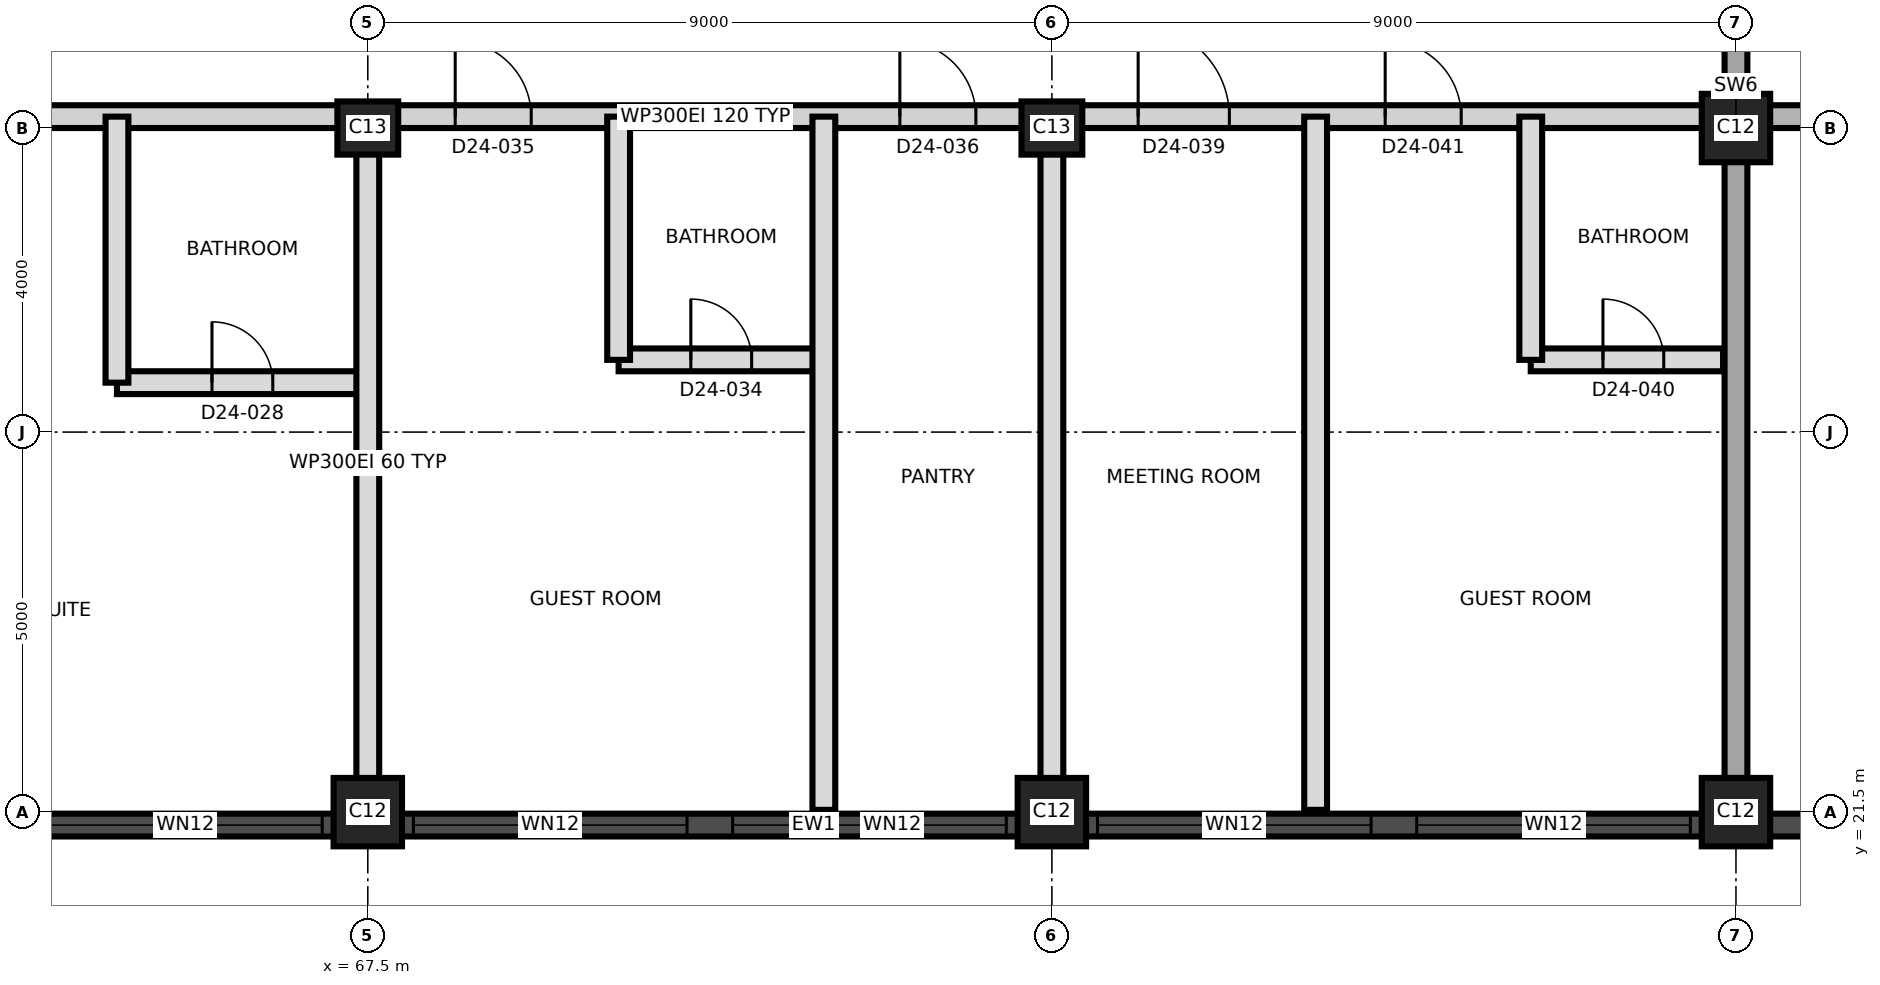
"""IFC4 building model, lengths in metres.
Left out: names, types, materials, properties, quantities, classifications, styles, units other than length and angle.
Written with IfcOpenShell. Run it as: python <this file> out.ifc"""

import sys

from ifc_helpers import new_model, si_unit, direction, frame, frame_2d, origin, origin_2d, place, context, subcontext, project, spatial, rectangle, extrude, element, fill, save


model = new_model("IFC4")
c1 = context("Model", 3, precision=1e-05, world=origin(), true_north=direction((0.0, 1.0)))
c2 = subcontext(c1, "Body", "Model", "MODEL_VIEW")
j1 = project(units=[si_unit("LENGTHUNIT", "METRE"), si_unit("PLANEANGLEUNIT", "RADIAN")], contexts=[c1])
p1 = place(None, origin())
s1 = spatial("IfcSite", under=j1, at=p1, CompositionType="ELEMENT")
p2 = place(p1, origin())
s2 = spatial("IfcBuilding", under=s1, at=p2, CompositionType="ELEMENT")
p3 = place(p2, frame((0.0, 0.0, 218.0)))
s3 = spatial("IfcBuildingStorey", under=s2, at=p3, CompositionType="ELEMENT", Elevation=218.0)
for number, where, z_axis, x_axis in (
    (1, (67.5, 21.5, 0.0), (0.0, 0.0, 1.0), (1.0, 0.0, 0.0)),
    (2, (76.5, 21.5, 0.0), (0.0, 0.0, 1.0), (1.0, 0.0, 0.0)),
    (3, (85.5, 21.5, 0.0), (0.0, 0.0, 1.0), (1.0, 0.0, 0.0)),
):
    element("IfcColumn", number, at=place(p3, frame(where, z_axis=z_axis, x_axis=x_axis)), inside=s3, PredefinedType="COLUMN", context=c2, shape_type="SweptSolid", body=[
        extrude(rectangle(XDim=0.9, YDim=0.9, at=origin_2d()), origin(), (0.0, 0.0, 1.0), 3.7),
    ])
for number, where, z_axis, x_axis in (
    (4, (67.5, 30.5, 0.0), (0.0, 0.0, 1.0), (1.0, 0.0, 0.0)),
    (5, (76.5, 30.5, 0.0), (0.0, 0.0, 1.0), (1.0, 0.0, 0.0)),
):
    element("IfcColumn", number, at=place(p3, frame(where, z_axis=z_axis, x_axis=x_axis)), inside=s3, PredefinedType="COLUMN", context=c2, shape_type="SweptSolid", body=[
        extrude(rectangle(XDim=0.8, YDim=0.7, at=origin_2d()), origin(), (0.0, 0.0, 1.0), 3.7),
    ])
p4 = place(p3, frame((85.5, 30.5, 0.0), z_axis=(0.0, 0.0, 1.0), x_axis=(1.0, 0.0, 0.0)))
e6 = element("IfcColumn", 6, at=p4, inside=s3, PredefinedType="COLUMN", context=c2, shape_type="SweptSolid", body=[
    extrude(rectangle(XDim=0.9, YDim=0.9, at=origin_2d()), origin(), (0.0, 0.0, 1.0), 3.7),
])
p5 = place(p3, frame((85.5, 21.53, 0.0), z_axis=(0.0, 0.0, 1.0), x_axis=(0.0, 1.0, 0.0)))
e7 = element("IfcWall", 7, at=p5, inside=s3, PredefinedType="SHEAR", context=c2, shape_type="SweptSolid", body=[
    extrude(rectangle(XDim=17.94, YDim=0.3, at=frame_2d((8.97, 0.0))), origin(), (0.0, 0.0, 1.0), 3.7),
])
p6 = place(p5, frame((10.17, 0.0, 0.0)))
e8 = element("IfcOpeningElement", 8, at=p6, cuts=e7, PredefinedType="OPENING", context=c2, shape_type="SweptSolid", body=[
    extrude(rectangle(XDim=1.4, YDim=2.1, at=frame_2d((0.7, 1.05))), frame((0.0, 0.16, 0.0), z_axis=(0.0, -1.0, 0.0), x_axis=(1.0, 0.0, 0.0)), (0.0, 0.0, 1.0), 0.32),
])
p7 = place(p3, frame((59.25, 21.33, 0.0), z_axis=(0.0, 0.0, 1.0), x_axis=(1.0, 0.0, 0.0)))
e9 = element("IfcWall", 9, at=p7, inside=s3, PredefinedType="SOLIDWALL", context=c2, shape_type="SweptSolid", body=[
    extrude(rectangle(XDim=28.234, YDim=0.3, at=frame_2d((14.117, 0.0))), origin(), (0.0, 0.0, 1.0), 3.4),
])
p8 = place(p7, frame((0.975, 0.0, 0.3)))
e10 = element("IfcOpeningElement", 10, at=p8, cuts=e9, PredefinedType="OPENING", context=c2, shape_type="SweptSolid", body=[
    extrude(rectangle(XDim=1.8, YDim=2.4, at=frame_2d((0.9, 1.2))), frame((0.0, 0.16, 0.0), z_axis=(0.0, -1.0, 0.0), x_axis=(1.0, 0.0, 0.0)), (0.0, 0.0, 1.0), 0.32),
])
p9 = place(p7, frame((4.05, 0.0, 0.9)))
e11 = element("IfcOpeningElement", 11, at=p9, cuts=e9, PredefinedType="OPENING", context=c2, shape_type="SweptSolid", body=[
    extrude(rectangle(XDim=3.6, YDim=1.5, at=frame_2d((1.8, 0.75))), frame((0.0, 0.16, 0.0), z_axis=(0.0, -1.0, 0.0), x_axis=(1.0, 0.0, 0.0)), (0.0, 0.0, 1.0), 0.32),
])
p10 = place(p7, frame((8.85, 0.0, 0.9)))
e12 = element("IfcOpeningElement", 12, at=p10, cuts=e9, PredefinedType="OPENING", context=c2, shape_type="SweptSolid", body=[
    extrude(rectangle(XDim=3.6, YDim=1.5, at=frame_2d((1.8, 0.75))), frame((0.0, 0.16, 0.0), z_axis=(0.0, -1.0, 0.0), x_axis=(1.0, 0.0, 0.0)), (0.0, 0.0, 1.0), 0.32),
])
p11 = place(p7, frame((13.05, 0.0, 0.9)))
e13 = element("IfcOpeningElement", 13, at=p11, cuts=e9, PredefinedType="OPENING", context=c2, shape_type="SweptSolid", body=[
    extrude(rectangle(XDim=3.6, YDim=1.5, at=frame_2d((1.8, 0.75))), frame((0.0, 0.16, 0.0), z_axis=(0.0, -1.0, 0.0), x_axis=(1.0, 0.0, 0.0)), (0.0, 0.0, 1.0), 0.32),
])
p12 = place(p7, frame((17.85, 0.0, 0.9)))
e14 = element("IfcOpeningElement", 14, at=p12, cuts=e9, PredefinedType="OPENING", context=c2, shape_type="SweptSolid", body=[
    extrude(rectangle(XDim=3.6, YDim=1.5, at=frame_2d((1.8, 0.75))), frame((0.0, 0.16, 0.0), z_axis=(0.0, -1.0, 0.0), x_axis=(1.0, 0.0, 0.0)), (0.0, 0.0, 1.0), 0.32),
])
p13 = place(p7, frame((22.05, 0.0, 0.9)))
e15 = element("IfcOpeningElement", 15, at=p13, cuts=e9, PredefinedType="OPENING", context=c2, shape_type="SweptSolid", body=[
    extrude(rectangle(XDim=3.6, YDim=1.5, at=frame_2d((1.8, 0.75))), frame((0.0, 0.16, 0.0), z_axis=(0.0, -1.0, 0.0), x_axis=(1.0, 0.0, 0.0)), (0.0, 0.0, 1.0), 0.32),
])
p14 = place(p3, frame((64.2, 27.15, 0.0), z_axis=(0.0, 0.0, 1.0), x_axis=(1.0, 0.0, 0.0)))
e16 = element("IfcWall", 16, at=p14, inside=s3, PredefinedType="PARTITIONING", context=c2, shape_type="SweptSolid", body=[
    extrude(rectangle(XDim=3.3, YDim=0.3, at=frame_2d((1.65, 0.0))), origin(), (0.0, 0.0, 1.0), 3.4),
])
p15 = place(p14, frame((1.25, 0.0, 0.0)))
e17 = element("IfcOpeningElement", 17, at=p15, cuts=e16, PredefinedType="OPENING", context=c2, shape_type="SweptSolid", body=[
    extrude(rectangle(XDim=0.8, YDim=2.1, at=frame_2d((0.4, 1.05))), frame((0.0, 0.16, 0.0), z_axis=(0.0, -1.0, 0.0), x_axis=(1.0, 0.0, 0.0)), (0.0, 0.0, 1.0), 0.32),
])
p16 = place(p3, frame((70.8, 27.45, 0.0), z_axis=(0.0, 0.0, 1.0), x_axis=(1.0, 0.0, 0.0)))
e18 = element("IfcWall", 18, at=p16, inside=s3, PredefinedType="PARTITIONING", context=c2, shape_type="SweptSolid", body=[
    extrude(rectangle(XDim=2.7, YDim=0.3, at=frame_2d((1.35, 0.0))), origin(), (0.0, 0.0, 1.0), 3.4),
])
p17 = place(p16, frame((0.95, 0.0, 0.0)))
e19 = element("IfcOpeningElement", 19, at=p17, cuts=e18, PredefinedType="OPENING", context=c2, shape_type="SweptSolid", body=[
    extrude(rectangle(XDim=0.8, YDim=2.1, at=frame_2d((0.4, 1.05))), frame((0.0, 0.16, 0.0), z_axis=(0.0, -1.0, 0.0), x_axis=(1.0, 0.0, 0.0)), (0.0, 0.0, 1.0), 0.32),
])
p18 = place(p3, frame((82.8, 27.45, 0.0), z_axis=(0.0, 0.0, 1.0), x_axis=(1.0, 0.0, 0.0)))
e20 = element("IfcWall", 20, at=p18, inside=s3, PredefinedType="PARTITIONING", context=c2, shape_type="SweptSolid", body=[
    extrude(rectangle(XDim=2.53, YDim=0.3, at=frame_2d((1.265, 0.0))), origin(), (0.0, 0.0, 1.0), 3.4),
])
p19 = place(p18, frame((0.95, 0.0, 0.0)))
e21 = element("IfcOpeningElement", 21, at=p19, cuts=e20, PredefinedType="OPENING", context=c2, shape_type="SweptSolid", body=[
    extrude(rectangle(XDim=0.8, YDim=2.1, at=frame_2d((0.4, 1.05))), frame((0.0, 0.16, 0.0), z_axis=(0.0, -1.0, 0.0), x_axis=(1.0, 0.0, 0.0)), (0.0, 0.0, 1.0), 0.32),
])
p20 = place(p3, frame((58.55, 30.65, 0.0), z_axis=(0.0, 0.0, 1.0), x_axis=(1.0, 0.0, 0.0)))
e22 = element("IfcWall", 22, at=p20, inside=s3, PredefinedType="PARTITIONING", context=c2, shape_type="SweptSolid", body=[
    extrude(rectangle(XDim=26.78, YDim=0.3, at=frame_2d((13.39, 0.0))), origin(), (0.0, 0.0, 1.0), 3.4),
])
p21 = place(p20, frame((2.3, 0.0, 0.0)))
e23 = element("IfcOpeningElement", 23, at=p21, cuts=e22, PredefinedType="OPENING", context=c2, shape_type="SweptSolid", body=[
    extrude(rectangle(XDim=1.0, YDim=2.4, at=frame_2d((0.5, 1.2))), frame((0.0, 0.16, 0.0), z_axis=(0.0, -1.0, 0.0), x_axis=(1.0, 0.0, 0.0)), (0.0, 0.0, 1.0), 0.32),
])
p22 = place(p20, frame((10.1, 0.0, 0.0)))
e24 = element("IfcOpeningElement", 24, at=p22, cuts=e22, PredefinedType="OPENING", context=c2, shape_type="SweptSolid", body=[
    extrude(rectangle(XDim=1.0, YDim=2.1, at=frame_2d((0.5, 1.05))), frame((0.0, 0.16, 0.0), z_axis=(0.0, -1.0, 0.0), x_axis=(1.0, 0.0, 0.0)), (0.0, 0.0, 1.0), 0.32),
])
p23 = place(p20, frame((15.95, 0.0, 0.0)))
e25 = element("IfcOpeningElement", 25, at=p23, cuts=e22, PredefinedType="OPENING", context=c2, shape_type="SweptSolid", body=[
    extrude(rectangle(XDim=1.0, YDim=2.1, at=frame_2d((0.5, 1.05))), frame((0.0, 0.16, 0.0), z_axis=(0.0, -1.0, 0.0), x_axis=(1.0, 0.0, 0.0)), (0.0, 0.0, 1.0), 0.32),
])
p24 = place(p20, frame((19.085, 0.0, 0.0)))
e26 = element("IfcOpeningElement", 26, at=p24, cuts=e22, PredefinedType="OPENING", context=c2, shape_type="SweptSolid", body=[
    extrude(rectangle(XDim=1.2, YDim=2.1, at=frame_2d((0.6, 1.05))), frame((0.0, 0.16, 0.0), z_axis=(0.0, -1.0, 0.0), x_axis=(1.0, 0.0, 0.0)), (0.0, 0.0, 1.0), 0.32),
])
p25 = place(p20, frame((22.335, 0.0, 0.0)))
e27 = element("IfcOpeningElement", 27, at=p25, cuts=e22, PredefinedType="OPENING", context=c2, shape_type="SweptSolid", body=[
    extrude(rectangle(XDim=1.0, YDim=2.1, at=frame_2d((0.5, 1.05))), frame((0.0, 0.16, 0.0), z_axis=(0.0, -1.0, 0.0), x_axis=(1.0, 0.0, 0.0)), (0.0, 0.0, 1.0), 0.32),
])
p26 = place(p3, frame((85.67, 30.65, 0.0), z_axis=(0.0, 0.0, 1.0), x_axis=(1.0, 0.0, 0.0)))
e28 = element("IfcWall", 28, at=p26, inside=s3, PredefinedType="SHEAR", context=c2, shape_type="SweptSolid", body=[
    extrude(rectangle(XDim=8.8, YDim=0.3, at=frame_2d((4.4, 0.0))), origin(), (0.0, 0.0, 1.0), 3.4),
])
p27 = place(p26, frame((2.08, 0.0, 0.0)))
e29 = element("IfcOpeningElement", 29, at=p27, cuts=e28, PredefinedType="OPENING", context=c2, shape_type="SweptSolid", body=[
    extrude(rectangle(XDim=1.2, YDim=2.1, at=frame_2d((0.6, 1.05))), frame((0.0, 0.16, 0.0), z_axis=(0.0, -1.0, 0.0), x_axis=(1.0, 0.0, 0.0)), (0.0, 0.0, 1.0), 0.32),
])
p28 = place(p26, frame((5.63, 0.0, 0.0)))
e30 = element("IfcOpeningElement", 30, at=p28, cuts=e28, PredefinedType="OPENING", context=c2, shape_type="SweptSolid", body=[
    extrude(rectangle(XDim=1.0, YDim=2.1, at=frame_2d((0.5, 1.05))), frame((0.0, 0.16, 0.0), z_axis=(0.0, -1.0, 0.0), x_axis=(1.0, 0.0, 0.0)), (0.0, 0.0, 1.0), 0.32),
])
p29 = place(p3, frame((64.2, 27.15, 0.0), z_axis=(0.0, 0.0, 1.0), x_axis=(0.0, 1.0, 0.0)))
e31 = element("IfcWall", 31, at=p29, inside=s3, PredefinedType="PARTITIONING", context=c2, shape_type="SweptSolid", body=[
    extrude(rectangle(XDim=3.5, YDim=0.3, at=frame_2d((1.75, 0.0))), origin(), (0.0, 0.0, 1.0), 3.4),
])
p30 = place(p3, frame((67.5, 21.53, 0.0), z_axis=(0.0, 0.0, 1.0), x_axis=(0.0, 1.0, 0.0)))
e32 = element("IfcWall", 32, at=p30, inside=s3, PredefinedType="PARTITIONING", context=c2, shape_type="SweptSolid", body=[
    extrude(rectangle(XDim=9.12, YDim=0.3, at=frame_2d((4.56, 0.0))), origin(), (0.0, 0.0, 1.0), 3.4),
])
p31 = place(p3, frame((70.8, 27.45, 0.0), z_axis=(0.0, 0.0, 1.0), x_axis=(0.0, 1.0, 0.0)))
e33 = element("IfcWall", 33, at=p31, inside=s3, PredefinedType="PARTITIONING", context=c2, shape_type="SweptSolid", body=[
    extrude(rectangle(XDim=3.2, YDim=0.3, at=frame_2d((1.6, 0.0))), origin(), (0.0, 0.0, 1.0), 3.4),
])
for number, where, z_axis, x_axis in (
    (34, (73.5, 21.53, 0.0), (0.0, 0.0, 1.0), (0.0, 1.0, 0.0)),
    (35, (76.5, 21.53, 0.0), (0.0, 0.0, 1.0), (0.0, 1.0, 0.0)),
    (36, (79.97, 21.53, 0.0), (0.0, 0.0, 1.0), (0.0, 1.0, 0.0)),
):
    element("IfcWall", number, at=place(p3, frame(where, z_axis=z_axis, x_axis=x_axis)), inside=s3, PredefinedType="PARTITIONING", context=c2, shape_type="SweptSolid", body=[
        extrude(rectangle(XDim=9.12, YDim=0.3, at=frame_2d((4.56, 0.0))), origin(), (0.0, 0.0, 1.0), 3.4),
    ])
p32 = place(p3, frame((82.8, 27.45, 0.0), z_axis=(0.0, 0.0, 1.0), x_axis=(0.0, 1.0, 0.0)))
e37 = element("IfcWall", 37, at=p32, inside=s3, PredefinedType="PARTITIONING", context=c2, shape_type="SweptSolid", body=[
    extrude(rectangle(XDim=3.2, YDim=0.3, at=frame_2d((1.6, 0.0))), origin(), (0.0, 0.0, 1.0), 3.4),
])
p33 = place(p9, origin())
e38 = element("IfcWindow", 38, at=p33, inside=s3, PartitioningType="SINGLE_PANEL", PredefinedType="WINDOW", context=c2, shape_type="SweptSolid", body=[
    extrude(rectangle(XDim=3.6, YDim=1.5, at=frame_2d((1.8, 0.75))), frame((0.0, 0.03, 0.0), z_axis=(0.0, -1.0, 0.0), x_axis=(1.0, 0.0, 0.0)), (0.0, 0.0, 1.0), 0.06),
])
fill(e11, e38)
p34 = place(p10, origin())
e39 = element("IfcWindow", 39, at=p34, inside=s3, PartitioningType="SINGLE_PANEL", PredefinedType="WINDOW", context=c2, shape_type="SweptSolid", body=[
    extrude(rectangle(XDim=3.6, YDim=1.5, at=frame_2d((1.8, 0.75))), frame((0.0, 0.03, 0.0), z_axis=(0.0, -1.0, 0.0), x_axis=(1.0, 0.0, 0.0)), (0.0, 0.0, 1.0), 0.06),
])
fill(e12, e39)
p35 = place(p11, origin())
e40 = element("IfcWindow", 40, at=p35, inside=s3, PartitioningType="SINGLE_PANEL", PredefinedType="WINDOW", context=c2, shape_type="SweptSolid", body=[
    extrude(rectangle(XDim=3.6, YDim=1.5, at=frame_2d((1.8, 0.75))), frame((0.0, 0.03, 0.0), z_axis=(0.0, -1.0, 0.0), x_axis=(1.0, 0.0, 0.0)), (0.0, 0.0, 1.0), 0.06),
])
fill(e13, e40)
p36 = place(p12, origin())
e41 = element("IfcWindow", 41, at=p36, inside=s3, PartitioningType="SINGLE_PANEL", PredefinedType="WINDOW", context=c2, shape_type="SweptSolid", body=[
    extrude(rectangle(XDim=3.6, YDim=1.5, at=frame_2d((1.8, 0.75))), frame((0.0, 0.03, 0.0), z_axis=(0.0, -1.0, 0.0), x_axis=(1.0, 0.0, 0.0)), (0.0, 0.0, 1.0), 0.06),
])
fill(e14, e41)
p37 = place(p13, origin())
e42 = element("IfcWindow", 42, at=p37, inside=s3, PartitioningType="SINGLE_PANEL", PredefinedType="WINDOW", context=c2, shape_type="SweptSolid", body=[
    extrude(rectangle(XDim=3.6, YDim=1.5, at=frame_2d((1.8, 0.75))), frame((0.0, 0.03, 0.0), z_axis=(0.0, -1.0, 0.0), x_axis=(1.0, 0.0, 0.0)), (0.0, 0.0, 1.0), 0.06),
])
fill(e15, e42)
p38 = place(p15, origin())
e43 = element("IfcDoor", 43, at=p38, inside=s3, OperationType="SINGLE_SWING_LEFT", PredefinedType="DOOR", context=c2, shape_type="SweptSolid", body=[
    extrude(rectangle(XDim=0.8, YDim=2.1, at=frame_2d((0.4, 1.05))), frame((0.0, 0.025, 0.0), z_axis=(0.0, -1.0, 0.0), x_axis=(1.0, 0.0, 0.0)), (0.0, 0.0, 1.0), 0.05),
])
fill(e17, e43)
p39 = place(p17, origin())
e44 = element("IfcDoor", 44, at=p39, inside=s3, OperationType="SINGLE_SWING_LEFT", PredefinedType="DOOR", context=c2, shape_type="SweptSolid", body=[
    extrude(rectangle(XDim=0.8, YDim=2.1, at=frame_2d((0.4, 1.05))), frame((0.0, 0.025, 0.0), z_axis=(0.0, -1.0, 0.0), x_axis=(1.0, 0.0, 0.0)), (0.0, 0.0, 1.0), 0.05),
])
fill(e19, e44)
p40 = place(p22, origin())
e45 = element("IfcDoor", 45, at=p40, inside=s3, OperationType="SINGLE_SWING_LEFT", PredefinedType="DOOR", context=c2, shape_type="SweptSolid", body=[
    extrude(rectangle(XDim=1.0, YDim=2.1, at=frame_2d((0.5, 1.05))), frame((0.0, 0.025, 0.0), z_axis=(0.0, -1.0, 0.0), x_axis=(1.0, 0.0, 0.0)), (0.0, 0.0, 1.0), 0.05),
])
fill(e24, e45)
p41 = place(p23, origin())
e46 = element("IfcDoor", 46, at=p41, inside=s3, OperationType="SINGLE_SWING_RIGHT", PredefinedType="DOOR", context=c2, shape_type="SweptSolid", body=[
    extrude(rectangle(XDim=1.0, YDim=2.1, at=frame_2d((0.5, 1.05))), frame((0.0, 0.025, 0.0), z_axis=(0.0, -1.0, 0.0), x_axis=(1.0, 0.0, 0.0)), (0.0, 0.0, 1.0), 0.05),
])
fill(e25, e46)
p42 = place(p24, origin())
e47 = element("IfcDoor", 47, at=p42, inside=s3, OperationType="SINGLE_SWING_RIGHT", PredefinedType="DOOR", context=c2, shape_type="SweptSolid", body=[
    extrude(rectangle(XDim=1.2, YDim=2.1, at=frame_2d((0.6, 1.05))), frame((0.0, 0.025, 0.0), z_axis=(0.0, -1.0, 0.0), x_axis=(1.0, 0.0, 0.0)), (0.0, 0.0, 1.0), 0.05),
])
fill(e26, e47)
p43 = place(p19, origin())
e48 = element("IfcDoor", 48, at=p43, inside=s3, OperationType="SINGLE_SWING_LEFT", PredefinedType="DOOR", context=c2, shape_type="SweptSolid", body=[
    extrude(rectangle(XDim=0.8, YDim=2.1, at=frame_2d((0.4, 1.05))), frame((0.0, 0.025, 0.0), z_axis=(0.0, -1.0, 0.0), x_axis=(1.0, 0.0, 0.0)), (0.0, 0.0, 1.0), 0.05),
])
fill(e21, e48)
p44 = place(p25, origin())
e49 = element("IfcDoor", 49, at=p44, inside=s3, OperationType="SINGLE_SWING_LEFT", PredefinedType="DOOR", context=c2, shape_type="SweptSolid", body=[
    extrude(rectangle(XDim=1.0, YDim=2.1, at=frame_2d((0.5, 1.05))), frame((0.0, 0.025, 0.0), z_axis=(0.0, -1.0, 0.0), x_axis=(1.0, 0.0, 0.0)), (0.0, 0.0, 1.0), 0.05),
])
fill(e27, e49)
save(model, sys.argv[1])
